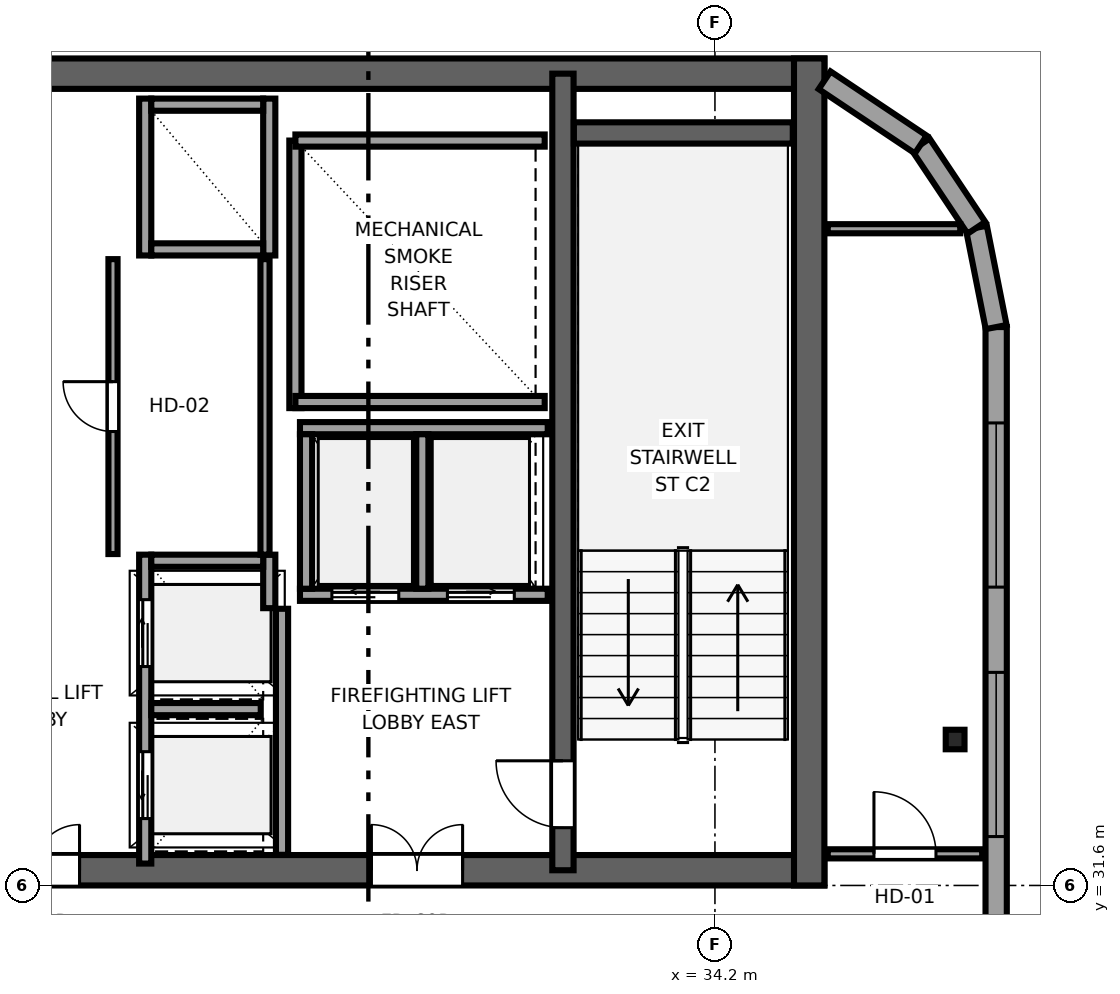
"""IFC4 building model, lengths in metres.
Left out: names, types, materials, properties, quantities, classifications, styles, units other than length and angle.
Written with IfcOpenShell. Run it as: python <this file> out.ifc"""

import sys

from ifc_helpers import new_model, si_unit, direction, frame, frame_2d, origin, origin_2d, place, context, subcontext, project, spatial, rectangle, i_section, extrude, source, transform, mapped, element, fill, save


model = new_model("IFC4")
c1 = context("Model", 3, precision=1e-05, world=origin(), true_north=direction((0.0, 1.0)))
c2 = subcontext(c1, "Body", "Model", "MODEL_VIEW")
j1 = project(units=[si_unit("LENGTHUNIT", "METRE"), si_unit("PLANEANGLEUNIT", "RADIAN")], contexts=[c1])
p1 = place(None, origin())
s1 = spatial("IfcSite", under=j1, at=p1, CompositionType="ELEMENT")
p2 = place(p1, origin())
s2 = spatial("IfcBuilding", under=s1, at=p2, CompositionType="ELEMENT")
p3 = place(p2, frame((0.0, 0.0, 259.4)))
s3 = spatial("IfcBuildingStorey", under=s2, at=p3, CompositionType="ELEMENT", Elevation=259.4)
p4 = place(p3, frame((10.0, 31.85, 0.0), z_axis=(0.0, 0.0, 1.0), x_axis=(1.0, 0.0, 0.0)))
e1 = element("IfcWall", 1, at=p4, inside=s3, PredefinedType="SHEAR", context=c2, shape_type="SweptSolid", body=[
    extrude(rectangle(XDim=26.0, YDim=0.5, at=frame_2d((13.0, 0.0))), origin(), (0.0, 0.0, 1.0), 3.55),
])
p5 = place(p4, frame((7.45, 0.0, 0.0), z_axis=(0.0, 0.0, 1.0), x_axis=(-1.0, 0.0, 0.0)))
e2 = element("IfcOpeningElement", 2, at=p5, cuts=e1, PredefinedType="OPENING", context=c2, shape_type="SweptSolid", body=[
    extrude(rectangle(XDim=1.5, YDim=2.04, at=frame_2d((0.75, 1.02))), frame((0.0, 0.26, 0.0), z_axis=(0.0, -1.0, 0.0), x_axis=(1.0, 0.0, 0.0)), (0.0, 0.0, 1.0), 0.52),
])
p6 = place(p4, frame((13.75, 0.0, 0.0), z_axis=(0.0, 0.0, 1.0), x_axis=(-1.0, 0.0, 0.0)))
e3 = element("IfcOpeningElement", 3, at=p6, cuts=e1, PredefinedType="OPENING", context=c2, shape_type="SweptSolid", body=[
    extrude(rectangle(XDim=1.5, YDim=2.04, at=frame_2d((0.75, 1.02))), frame((0.0, 0.26, 0.0), z_axis=(0.0, -1.0, 0.0), x_axis=(1.0, 0.0, 0.0)), (0.0, 0.0, 1.0), 0.52),
])
p7 = place(p4, frame((20.05, 0.0, 0.0), z_axis=(0.0, 0.0, 1.0), x_axis=(-1.0, 0.0, 0.0)))
e4 = element("IfcOpeningElement", 4, at=p7, cuts=e1, PredefinedType="OPENING", context=c2, shape_type="SweptSolid", body=[
    extrude(rectangle(XDim=1.5, YDim=2.04, at=frame_2d((0.75, 1.02))), frame((0.0, 0.26, 0.0), z_axis=(0.0, -1.0, 0.0), x_axis=(1.0, 0.0, 0.0)), (0.0, 0.0, 1.0), 0.52),
])
p8 = place(p3, frame((10.0, 44.95, 0.0), z_axis=(0.0, 0.0, 1.0), x_axis=(1.0, 0.0, 0.0)))
e5 = element("IfcWall", 5, at=p8, inside=s3, PredefinedType="SHEAR", context=c2, shape_type="SweptSolid", body=[
    extrude(rectangle(XDim=26.0, YDim=0.5, at=frame_2d((13.0, 0.0))), origin(), (0.0, 0.0, 1.0), 3.55),
])
p9 = place(p3, frame((35.75, 31.6, 0.0), z_axis=(0.0, 0.0, 1.0), x_axis=(0.0, 1.0, 0.0)))
e6 = element("IfcWall", 6, at=p9, inside=s3, PredefinedType="SHEAR", context=c2, shape_type="SweptSolid", body=[
    extrude(rectangle(XDim=13.6, YDim=0.5, at=frame_2d((6.8, 0.0))), origin(), (0.0, 0.0, 1.0), 3.55),
])
p10 = place(p3, frame((31.7, 31.85, 0.0), z_axis=(0.0, 0.0, 1.0), x_axis=(0.0, 1.0, 0.0)))
e7 = element("IfcWall", 7, at=p10, inside=s3, PredefinedType="SHEAR", context=c2, shape_type="SweptSolid", body=[
    extrude(rectangle(XDim=13.1, YDim=0.35, at=frame_2d((6.55, 0.0))), origin(), (0.0, 0.0, 1.0), 3.55),
])
p11 = place(p10, frame((1.8, 0.0, 0.0), z_axis=(0.0, 0.0, 1.0), x_axis=(-1.0, 0.0, 0.0)))
e8 = element("IfcOpeningElement", 8, at=p11, cuts=e7, PredefinedType="OPENING", context=c2, shape_type="SweptSolid", body=[
    extrude(rectangle(XDim=1.1, YDim=2.12, at=frame_2d((0.55, 1.06))), frame((0.0, 0.185, 0.0), z_axis=(0.0, -1.0, 0.0), x_axis=(1.0, 0.0, 0.0)), (0.0, 0.0, 1.0), 0.37),
])
p12 = place(p3, frame((31.88, 43.975, 0.0), z_axis=(0.0, 0.0, 1.0), x_axis=(1.0, 0.0, 0.0)))
e9 = element("IfcWall", 9, at=p12, inside=s3, PredefinedType="SHEAR", context=c2, shape_type="SweptSolid", body=[
    extrude(rectangle(XDim=3.6, YDim=0.35, at=frame_2d((1.8, 0.0))), origin(), (0.0, 0.0, 1.0), 3.55),
])
m1 = source(origin(), c2, "Body", "SweptSolid", [
    extrude(i_section(OverallWidth=0.309, OverallDepth=0.321, WebThickness=0.014, FlangeThickness=0.022, FilletRadius=0.017, at=origin_2d()), origin(), (0.0, 0.0, 1.0), 3.55),
])
p13 = place(p3, frame((38.15, 34.0, 0.0), z_axis=(0.0, 0.0, 1.0), x_axis=(1.0, 0.0, 0.0)))
e10 = element("IfcColumn", 10, at=p13, inside=s3, PredefinedType="COLUMN", context=c2, shape_type="MappedRepresentation", body=[
    mapped(m1, transform((0.0, 0.0, 0.0), x_axis=(1.0, 0.0, 0.0), y_axis=(0.0, 1.0, 0.0), z_axis=(0.0, 0.0, 1.0), scale=1.0)),
])
p14 = place(p3, frame((38.825, 7.017, 0.0), z_axis=(0.0, 0.0, 1.0), x_axis=(0.0, 1.0, 0.0)))
e11 = element("IfcWall", 11, at=p14, inside=s3, PredefinedType="SOLIDWALL", context=c2, shape_type="SweptSolid", body=[
    extrude(rectangle(XDim=33.766, YDim=0.35, at=frame_2d((16.883, 0.0))), origin(), (0.0, 0.0, 1.0), 3.37),
])
p15 = place(p14, frame((10.881, 0.0, 0.68)))
e12 = element("IfcOpeningElement", 12, at=p15, cuts=e11, PredefinedType="OPENING", context=c2, shape_type="SweptSolid", body=[
    extrude(rectangle(XDim=2.7, YDim=1.95, at=frame_2d((1.35, 0.975))), frame((0.0, 0.185, 0.0), z_axis=(0.0, -1.0, 0.0), x_axis=(1.0, 0.0, 0.0)), (0.0, 0.0, 1.0), 0.37),
])
p16 = place(p14, frame((15.533, 0.0, 0.68)))
e13 = element("IfcOpeningElement", 13, at=p16, cuts=e11, PredefinedType="OPENING", context=c2, shape_type="SweptSolid", body=[
    extrude(rectangle(XDim=2.7, YDim=1.95, at=frame_2d((1.35, 0.975))), frame((0.0, 0.185, 0.0), z_axis=(0.0, -1.0, 0.0), x_axis=(1.0, 0.0, 0.0)), (0.0, 0.0, 1.0), 0.37),
])
p17 = place(p14, frame((19.635, 0.0, 0.68)))
e14 = element("IfcOpeningElement", 14, at=p17, cuts=e11, PredefinedType="OPENING", context=c2, shape_type="SweptSolid", body=[
    extrude(rectangle(XDim=2.7, YDim=1.95, at=frame_2d((1.35, 0.975))), frame((0.0, 0.185, 0.0), z_axis=(0.0, -1.0, 0.0), x_axis=(1.0, 0.0, 0.0)), (0.0, 0.0, 1.0), 0.37),
])
p18 = place(p14, frame((25.387, 0.0, 0.68)))
e15 = element("IfcOpeningElement", 15, at=p18, cuts=e11, PredefinedType="OPENING", context=c2, shape_type="SweptSolid", body=[
    extrude(rectangle(XDim=2.7, YDim=1.95, at=frame_2d((1.35, 0.975))), frame((0.0, 0.185, 0.0), z_axis=(0.0, -1.0, 0.0), x_axis=(1.0, 0.0, 0.0)), (0.0, 0.0, 1.0), 0.37),
])
p19 = place(p14, frame((29.489, 0.0, 0.68)))
e16 = element("IfcOpeningElement", 16, at=p19, cuts=e11, PredefinedType="OPENING", context=c2, shape_type="SweptSolid", body=[
    extrude(rectangle(XDim=2.7, YDim=1.95, at=frame_2d((1.35, 0.975))), frame((0.0, 0.185, 0.0), z_axis=(0.0, -1.0, 0.0), x_axis=(1.0, 0.0, 0.0)), (0.0, 0.0, 1.0), 0.37),
])
p20 = place(p14, frame((0.686, 0.0, 0.62)))
e17 = element("IfcOpeningElement", 17, at=p20, cuts=e11, PredefinedType="OPENING", context=c2, shape_type="SweptSolid", body=[
    extrude(rectangle(XDim=1.5, YDim=1.55, at=frame_2d((0.75, 0.775))), frame((0.0, 0.185, 0.0), z_axis=(0.0, -1.0, 0.0), x_axis=(1.0, 0.0, 0.0)), (0.0, 0.0, 1.0), 0.37),
])
p21 = place(p14, frame((4.733, 0.0, 0.62)))
e18 = element("IfcOpeningElement", 18, at=p21, cuts=e11, PredefinedType="OPENING", context=c2, shape_type="SweptSolid", body=[
    extrude(rectangle(XDim=1.5, YDim=1.55, at=frame_2d((0.75, 0.775))), frame((0.0, 0.185, 0.0), z_axis=(0.0, -1.0, 0.0), x_axis=(1.0, 0.0, 0.0)), (0.0, 0.0, 1.0), 0.37),
])
p22 = place(p3, frame((38.825, 40.783, 0.0), z_axis=(0.0, 0.0, 1.0), x_axis=(-0.195044345786, 0.980794424524, 0.0)))
e19 = element("IfcWall", 19, at=p22, inside=s3, PredefinedType="SOLIDWALL", context=c2, shape_type="SweptSolid", body=[
    extrude(rectangle(XDim=1.665, YDim=0.35, at=frame_2d((0.833, 0.0))), origin(), (0.0, 0.0, 1.0), 3.37),
])
p23 = place(p3, frame((38.5, 42.416, 0.0), z_axis=(0.0, 0.0, 1.0), x_axis=(-0.555520825599, 0.831502623162, 0.0)))
e20 = element("IfcWall", 20, at=p23, inside=s3, PredefinedType="SOLIDWALL", context=c2, shape_type="SweptSolid", body=[
    extrude(rectangle(XDim=1.647, YDim=0.35, at=frame_2d((0.824, 0.0))), origin(), (0.0, 0.0, 1.0), 3.37),
])
p24 = place(p3, frame((37.585, 43.785, 0.0), z_axis=(0.0, 0.0, 1.0), x_axis=(-0.831516639465, 0.555499845448, 0.0)))
e21 = element("IfcWall", 21, at=p24, inside=s3, PredefinedType="SOLIDWALL", context=c2, shape_type="SweptSolid", body=[
    extrude(rectangle(XDim=1.902, YDim=0.35, at=frame_2d((0.951, 0.0))), origin(), (0.0, 0.0, 1.0), 3.37),
])
p25 = place(p3, frame((27.3, 39.45, 0.0), z_axis=(0.0, 0.0, 1.0), x_axis=(0.0, 1.0, 0.0)))
e22 = element("IfcWall", 22, at=p25, inside=s3, PredefinedType="SOLIDWALL", context=c2, shape_type="SweptSolid", body=[
    extrude(rectangle(XDim=4.4, YDim=0.2, at=frame_2d((2.2, 0.0))), origin(), (0.0, 0.0, 1.0), 3.37),
])
for number, where, z_axis, x_axis in (
    (23, (27.3, 39.55, 0.0), (0.0, 0.0, 1.0), (1.0, 0.0, 0.0)),
    (24, (27.3, 43.85, 0.0), (0.0, 0.0, 1.0), (1.0, 0.0, 0.0)),
):
    element("IfcWall", number, at=place(p3, frame(where, z_axis=z_axis, x_axis=x_axis)), inside=s3, PredefinedType="SOLIDWALL", context=c2, shape_type="SweptSolid", body=[
        extrude(rectangle(XDim=4.1, YDim=0.2, at=frame_2d((2.05, 0.0))), origin(), (0.0, 0.0, 1.0), 3.37),
    ])
p26 = place(p3, frame((27.08, 32.104, 0.0), z_axis=(0.0, 0.0, 1.0), x_axis=(0.0, 1.0, 0.0)))
e25 = element("IfcWall", 25, at=p26, inside=s3, PredefinedType="SOLIDWALL", context=c2, shape_type="SweptSolid", body=[
    extrude(rectangle(XDim=4.046, YDim=0.2, at=frame_2d((2.023, 0.0))), origin(), (0.0, 0.0, 1.0), 3.37),
])
p27 = place(p3, frame((27.375, 36.38, 0.0), z_axis=(0.0, 0.0, 1.0), x_axis=(1.0, 0.0, 0.0)))
e26 = element("IfcWall", 26, at=p27, inside=s3, PredefinedType="SOLIDWALL", context=c2, shape_type="SweptSolid", body=[
    extrude(rectangle(XDim=4.075, YDim=0.2, at=frame_2d((2.038, 0.0))), origin(), (0.0, 0.0, 1.0), 3.37),
])
p28 = place(p27, frame((0.525, 0.0, 0.0)))
e27 = element("IfcOpeningElement", 27, at=p28, cuts=e26, PredefinedType="OPENING", context=c2, shape_type="SweptSolid", body=[
    extrude(rectangle(XDim=1.1, YDim=2.12, at=frame_2d((0.55, 1.06))), frame((0.0, 0.11, 0.0), z_axis=(0.0, -1.0, 0.0), x_axis=(1.0, 0.0, 0.0)), (0.0, 0.0, 1.0), 0.22),
])
p29 = place(p27, frame((2.425, 0.0, 0.0)))
e28 = element("IfcOpeningElement", 28, at=p29, cuts=e26, PredefinedType="OPENING", context=c2, shape_type="SweptSolid", body=[
    extrude(rectangle(XDim=1.1, YDim=2.12, at=frame_2d((0.55, 1.06))), frame((0.0, 0.11, 0.0), z_axis=(0.0, -1.0, 0.0), x_axis=(1.0, 0.0, 0.0)), (0.0, 0.0, 1.0), 0.22),
])
p30 = place(p3, frame((27.375, 39.12, 0.0), z_axis=(0.0, 0.0, 1.0), x_axis=(1.0, 0.0, 0.0)))
e29 = element("IfcWall", 29, at=p30, inside=s3, PredefinedType="SOLIDWALL", context=c2, shape_type="SweptSolid", body=[
    extrude(rectangle(XDim=4.075, YDim=0.2, at=frame_2d((2.038, 0.0))), origin(), (0.0, 0.0, 1.0), 3.37),
])
for number, where, z_axis, x_axis in (
    (30, (27.475, 36.48, 0.0), (0.0, 0.0, 1.0), (0.0, 1.0, 0.0)),
    (31, (29.387, 36.48, 0.0), (0.0, 0.0, 1.0), (0.0, 1.0, 0.0)),
):
    element("IfcWall", number, at=place(p3, frame(where, z_axis=z_axis, x_axis=x_axis)), inside=s3, PredefinedType="SOLIDWALL", context=c2, shape_type="SweptSolid", body=[
        extrude(rectangle(XDim=2.54, YDim=0.2, at=frame_2d((1.27, 0.0))), origin(), (0.0, 0.0, 1.0), 3.37),
    ])
p31 = place(p3, frame((24.83, 31.96, 0.0), z_axis=(0.0, 0.0, 1.0), x_axis=(0.0, 1.0, 0.0)))
e32 = element("IfcWall", 32, at=p31, inside=s3, PredefinedType="SOLIDWALL", context=c2, shape_type="SweptSolid", body=[
    extrude(rectangle(XDim=5.08, YDim=0.2, at=frame_2d((2.54, 0.0))), origin(), (0.0, 0.0, 1.0), 3.37),
])
p32 = place(p31, frame((0.74, 0.0, 0.0)))
e33 = element("IfcOpeningElement", 33, at=p32, cuts=e32, PredefinedType="OPENING", context=c2, shape_type="SweptSolid", body=[
    extrude(rectangle(XDim=1.1, YDim=2.12, at=frame_2d((0.55, 1.06))), frame((0.0, 0.11, 0.0), z_axis=(0.0, -1.0, 0.0), x_axis=(1.0, 0.0, 0.0)), (0.0, 0.0, 1.0), 0.22),
])
p33 = place(p31, frame((3.24, 0.0, 0.0)))
e34 = element("IfcOpeningElement", 34, at=p33, cuts=e32, PredefinedType="OPENING", context=c2, shape_type="SweptSolid", body=[
    extrude(rectangle(XDim=1.1, YDim=2.12, at=frame_2d((0.55, 1.06))), frame((0.0, 0.11, 0.0), z_axis=(0.0, -1.0, 0.0), x_axis=(1.0, 0.0, 0.0)), (0.0, 0.0, 1.0), 0.22),
])
p34 = place(p3, frame((26.87, 36.16, 0.0), z_axis=(0.0, 0.0, 1.0), x_axis=(0.0, 1.0, 0.0)))
e35 = element("IfcWall", 35, at=p34, inside=s3, PredefinedType="SOLIDWALL", context=c2, shape_type="SweptSolid", body=[
    extrude(rectangle(XDim=0.88, YDim=0.2, at=frame_2d((0.44, 0.0))), origin(), (0.0, 0.0, 1.0), 3.37),
])
p35 = place(p3, frame((24.93, 36.94, 0.0), z_axis=(0.0, 0.0, 1.0), x_axis=(1.0, 0.0, 0.0)))
e36 = element("IfcWall", 36, at=p35, inside=s3, PredefinedType="SOLIDWALL", context=c2, shape_type="SweptSolid", body=[
    extrude(rectangle(XDim=1.84, YDim=0.2, at=frame_2d((0.92, 0.0))), origin(), (0.0, 0.0, 1.0), 3.37),
])
p36 = place(p3, frame((24.93, 34.5, 0.0), z_axis=(0.0, 0.0, 1.0), x_axis=(1.0, 0.0, 0.0)))
e37 = element("IfcWall", 37, at=p36, inside=s3, PredefinedType="SOLIDWALL", context=c2, shape_type="SweptSolid", body=[
    extrude(rectangle(XDim=1.8, YDim=0.2, at=frame_2d((0.9, 0.0))), origin(), (0.0, 0.0, 1.0), 3.37),
])
for number, where, z_axis, x_axis in (
    (38, (24.83, 41.96, 0.0), (0.0, 0.0, 1.0), (0.0, 1.0, 0.0)),
    (39, (26.87, 41.96, 0.0), (0.0, 0.0, 1.0), (0.0, 1.0, 0.0)),
):
    element("IfcWall", number, at=place(p3, frame(where, z_axis=z_axis, x_axis=x_axis)), inside=s3, PredefinedType="SOLIDWALL", context=c2, shape_type="SweptSolid", body=[
        extrude(rectangle(XDim=2.58, YDim=0.2, at=frame_2d((1.29, 0.0))), origin(), (0.0, 0.0, 1.0), 3.37),
    ])
for number, where, z_axis, x_axis in (
    (40, (24.93, 42.06, 0.0), (0.0, 0.0, 1.0), (1.0, 0.0, 0.0)),
    (41, (24.93, 44.44, 0.0), (0.0, 0.0, 1.0), (1.0, 0.0, 0.0)),
):
    element("IfcWall", number, at=place(p3, frame(where, z_axis=z_axis, x_axis=x_axis)), inside=s3, PredefinedType="SOLIDWALL", context=c2, shape_type="SweptSolid", body=[
        extrude(rectangle(XDim=1.84, YDim=0.2, at=frame_2d((0.92, 0.0))), origin(), (0.0, 0.0, 1.0), 3.37),
    ])
p37 = place(p3, frame((24.3, 37.05, 0.0), z_axis=(0.0, 0.0, 1.0), x_axis=(0.0, 1.0, 0.0)))
e42 = element("IfcWall", 42, at=p37, inside=s3, PredefinedType="PARTITIONING", context=c2, shape_type="SweptSolid", body=[
    extrude(rectangle(XDim=4.85, YDim=0.15, at=frame_2d((2.425, 0.0))), origin(), (0.0, 0.0, 1.0), 3.37),
])
p38 = place(p37, frame((2.015, 0.0, 0.0)))
e43 = element("IfcOpeningElement", 43, at=p38, cuts=e42, PredefinedType="OPENING", context=c2, shape_type="SweptSolid", body=[
    extrude(rectangle(XDim=0.82, YDim=2.01, at=frame_2d((0.41, 1.005))), frame((0.0, 0.085, 0.0), z_axis=(0.0, -1.0, 0.0), x_axis=(1.0, 0.0, 0.0)), (0.0, 0.0, 1.0), 0.17),
])
p39 = place(p3, frame((26.8, 37.04, 0.0), z_axis=(0.0, 0.0, 1.0), x_axis=(0.0, 1.0, 0.0)))
e44 = element("IfcWall", 44, at=p39, inside=s3, PredefinedType="PARTITIONING", context=c2, shape_type="SweptSolid", body=[
    extrude(rectangle(XDim=4.86, YDim=0.15, at=frame_2d((2.43, 0.0))), origin(), (0.0, 0.0, 1.0), 3.37),
])
p40 = place(p3, frame((36.055, 32.12, 0.0), z_axis=(0.0, 0.0, 1.0), x_axis=(1.0, 0.0, 0.0)))
e45 = element("IfcWall", 45, at=p40, inside=s3, PredefinedType="PARTITIONING", context=c2, shape_type="SweptSolid", body=[
    extrude(rectangle(XDim=2.54, YDim=0.15, at=frame_2d((1.27, 0.0))), origin(), (0.0, 0.0, 1.0), 3.37),
])
p41 = place(p40, frame((0.76, 0.0, 0.0)))
e46 = element("IfcOpeningElement", 46, at=p41, cuts=e45, PredefinedType="OPENING", context=c2, shape_type="SweptSolid", body=[
    extrude(rectangle(XDim=1.02, YDim=2.03, at=frame_2d((0.51, 1.015))), frame((0.0, 0.085, 0.0), z_axis=(0.0, -1.0, 0.0), x_axis=(1.0, 0.0, 0.0)), (0.0, 0.0, 1.0), 0.17),
])
p42 = place(p3, frame((36.055, 42.4, 0.0), z_axis=(0.0, 0.0, 1.0), x_axis=(1.0, 0.0, 0.0)))
e47 = element("IfcWall", 47, at=p42, inside=s3, PredefinedType="PARTITIONING", context=c2, shape_type="SweptSolid", body=[
    extrude(rectangle(XDim=2.179, YDim=0.15, at=frame_2d((1.089, 0.0))), origin(), (0.0, 0.0, 1.0), 3.37),
])
m2 = source(origin(), c2, "Body", "SweptSolid", [
    extrude(rectangle(XDim=2.7, YDim=1.95, at=frame_2d((1.35, 0.975))), frame((0.0, 0.09, 0.0), z_axis=(0.0, -1.0, 0.0), x_axis=(1.0, 0.0, 0.0)), (0.0, 0.0, 1.0), 0.06),
])
p43 = place(p18, origin())
e48 = element("IfcWindow", 48, at=p43, inside=s3, PartitioningType="TRIPLE_PANEL_HORIZONTAL", PredefinedType="WINDOW", context=c2, shape_type="MappedRepresentation", body=[
    mapped(m2, transform((0.0, 0.0, 0.0), x_axis=(1.0, 0.0, 0.0), y_axis=(0.0, 1.0, 0.0), z_axis=(0.0, 0.0, 1.0), scale=1.0)),
])
fill(e15, e48)
p44 = place(p19, origin())
e49 = element("IfcWindow", 49, at=p44, inside=s3, PartitioningType="TRIPLE_PANEL_HORIZONTAL", PredefinedType="WINDOW", context=c2, shape_type="MappedRepresentation", body=[
    mapped(m2, transform((0.0, 0.0, 0.0), x_axis=(1.0, 0.0, 0.0), y_axis=(0.0, 1.0, 0.0), z_axis=(0.0, 0.0, 1.0), scale=1.0)),
])
fill(e16, e49)
m3 = source(origin(), c2, "Body", "SweptSolid", [
    extrude(rectangle(XDim=1.1, YDim=2.12, at=frame_2d((0.55, 1.06))), frame((0.0, 0.025, 0.0), z_axis=(0.0, -1.0, 0.0), x_axis=(1.0, 0.0, 0.0)), (0.0, 0.0, 1.0), 0.05),
])
p45 = place(p11, origin())
e50 = element("IfcDoor", 50, at=p45, inside=s3, OperationType="SINGLE_SWING_RIGHT", PredefinedType="DOOR", context=c2, shape_type="MappedRepresentation", body=[
    mapped(m3, transform((0.0, 0.0, 0.0), x_axis=(1.0, 0.0, 0.0), y_axis=(0.0, 1.0, 0.0), z_axis=(0.0, 0.0, 1.0), scale=1.0)),
])
fill(e8, e50)
m4 = source(origin(), c2, "Body", "SweptSolid", [
    extrude(rectangle(XDim=1.5, YDim=2.04, at=frame_2d((0.75, 1.02))), frame((0.0, 0.025, 0.0), z_axis=(0.0, -1.0, 0.0), x_axis=(1.0, 0.0, 0.0)), (0.0, 0.0, 1.0), 0.05),
])
p46 = place(p6, origin())
e51 = element("IfcDoor", 51, at=p46, inside=s3, OperationType="DOUBLE_DOOR_SINGLE_SWING", PredefinedType="DOOR", context=c2, shape_type="MappedRepresentation", body=[
    mapped(m4, transform((0.0, 0.0, 0.0), x_axis=(1.0, 0.0, 0.0), y_axis=(0.0, 1.0, 0.0), z_axis=(0.0, 0.0, 1.0), scale=1.0)),
])
fill(e3, e51)
p47 = place(p7, origin())
e52 = element("IfcDoor", 52, at=p47, inside=s3, OperationType="DOUBLE_DOOR_SINGLE_SWING", PredefinedType="DOOR", context=c2, shape_type="MappedRepresentation", body=[
    mapped(m4, transform((0.0, 0.0, 0.0), x_axis=(1.0, 0.0, 0.0), y_axis=(0.0, 1.0, 0.0), z_axis=(0.0, 0.0, 1.0), scale=1.0)),
])
fill(e4, e52)
m5 = source(origin(), c2, "Body", "SweptSolid", [
    extrude(rectangle(XDim=1.1, YDim=2.12, at=frame_2d((0.55, 1.06))), frame((0.0, 0.025, 0.0), z_axis=(0.0, -1.0, 0.0), x_axis=(1.0, 0.0, 0.0)), (0.0, 0.0, 1.0), 0.05),
])
p48 = place(p28, origin())
e53 = element("IfcDoor", 53, at=p48, inside=s3, OperationType="SLIDING_TO_LEFT", PredefinedType="DOOR", context=c2, shape_type="MappedRepresentation", body=[
    mapped(m5, transform((0.0, 0.0, 0.0), x_axis=(1.0, 0.0, 0.0), y_axis=(0.0, 1.0, 0.0), z_axis=(0.0, 0.0, 1.0), scale=1.0)),
])
fill(e27, e53)
p49 = place(p29, origin())
e54 = element("IfcDoor", 54, at=p49, inside=s3, OperationType="SLIDING_TO_RIGHT", PredefinedType="DOOR", context=c2, shape_type="MappedRepresentation", body=[
    mapped(m5, transform((0.0, 0.0, 0.0), x_axis=(1.0, 0.0, 0.0), y_axis=(0.0, 1.0, 0.0), z_axis=(0.0, 0.0, 1.0), scale=1.0)),
])
fill(e28, e54)
p50 = place(p32, origin())
e55 = element("IfcDoor", 55, at=p50, inside=s3, OperationType="SLIDING_TO_LEFT", PredefinedType="DOOR", context=c2, shape_type="MappedRepresentation", body=[
    mapped(m5, transform((0.0, 0.0, 0.0), x_axis=(1.0, 0.0, 0.0), y_axis=(0.0, 1.0, 0.0), z_axis=(0.0, 0.0, 1.0), scale=1.0)),
])
fill(e33, e55)
p51 = place(p33, origin())
e56 = element("IfcDoor", 56, at=p51, inside=s3, OperationType="SLIDING_TO_RIGHT", PredefinedType="DOOR", context=c2, shape_type="MappedRepresentation", body=[
    mapped(m5, transform((0.0, 0.0, 0.0), x_axis=(1.0, 0.0, 0.0), y_axis=(0.0, 1.0, 0.0), z_axis=(0.0, 0.0, 1.0), scale=1.0)),
])
fill(e34, e56)
m6 = source(origin(), c2, "Body", "SweptSolid", [
    extrude(rectangle(XDim=0.82, YDim=2.01, at=frame_2d((0.41, 1.005))), frame((0.0, 0.025, 0.0), z_axis=(0.0, -1.0, 0.0), x_axis=(1.0, 0.0, 0.0)), (0.0, 0.0, 1.0), 0.05),
])
p52 = place(p38, origin())
e57 = element("IfcDoor", 57, at=p52, inside=s3, OperationType="SINGLE_SWING_RIGHT", PredefinedType="DOOR", context=c2, shape_type="MappedRepresentation", body=[
    mapped(m6, transform((0.0, 0.0, 0.0), x_axis=(1.0, 0.0, 0.0), y_axis=(0.0, 1.0, 0.0), z_axis=(0.0, 0.0, 1.0), scale=1.0)),
])
fill(e43, e57)
m7 = source(origin(), c2, "Body", "SweptSolid", [
    extrude(rectangle(XDim=1.02, YDim=2.03, at=frame_2d((0.51, 1.015))), frame((0.0, 0.025, 0.0), z_axis=(0.0, -1.0, 0.0), x_axis=(1.0, 0.0, 0.0)), (0.0, 0.0, 1.0), 0.05),
])
p53 = place(p41, origin())
e58 = element("IfcDoor", 58, at=p53, inside=s3, OperationType="SINGLE_SWING_LEFT", PredefinedType="DOOR", context=c2, shape_type="MappedRepresentation", body=[
    mapped(m7, transform((0.0, 0.0, 0.0), x_axis=(1.0, 0.0, 0.0), y_axis=(0.0, 1.0, 0.0), z_axis=(0.0, 0.0, 1.0), scale=1.0)),
])
fill(e46, e58)
save(model, sys.argv[1])
